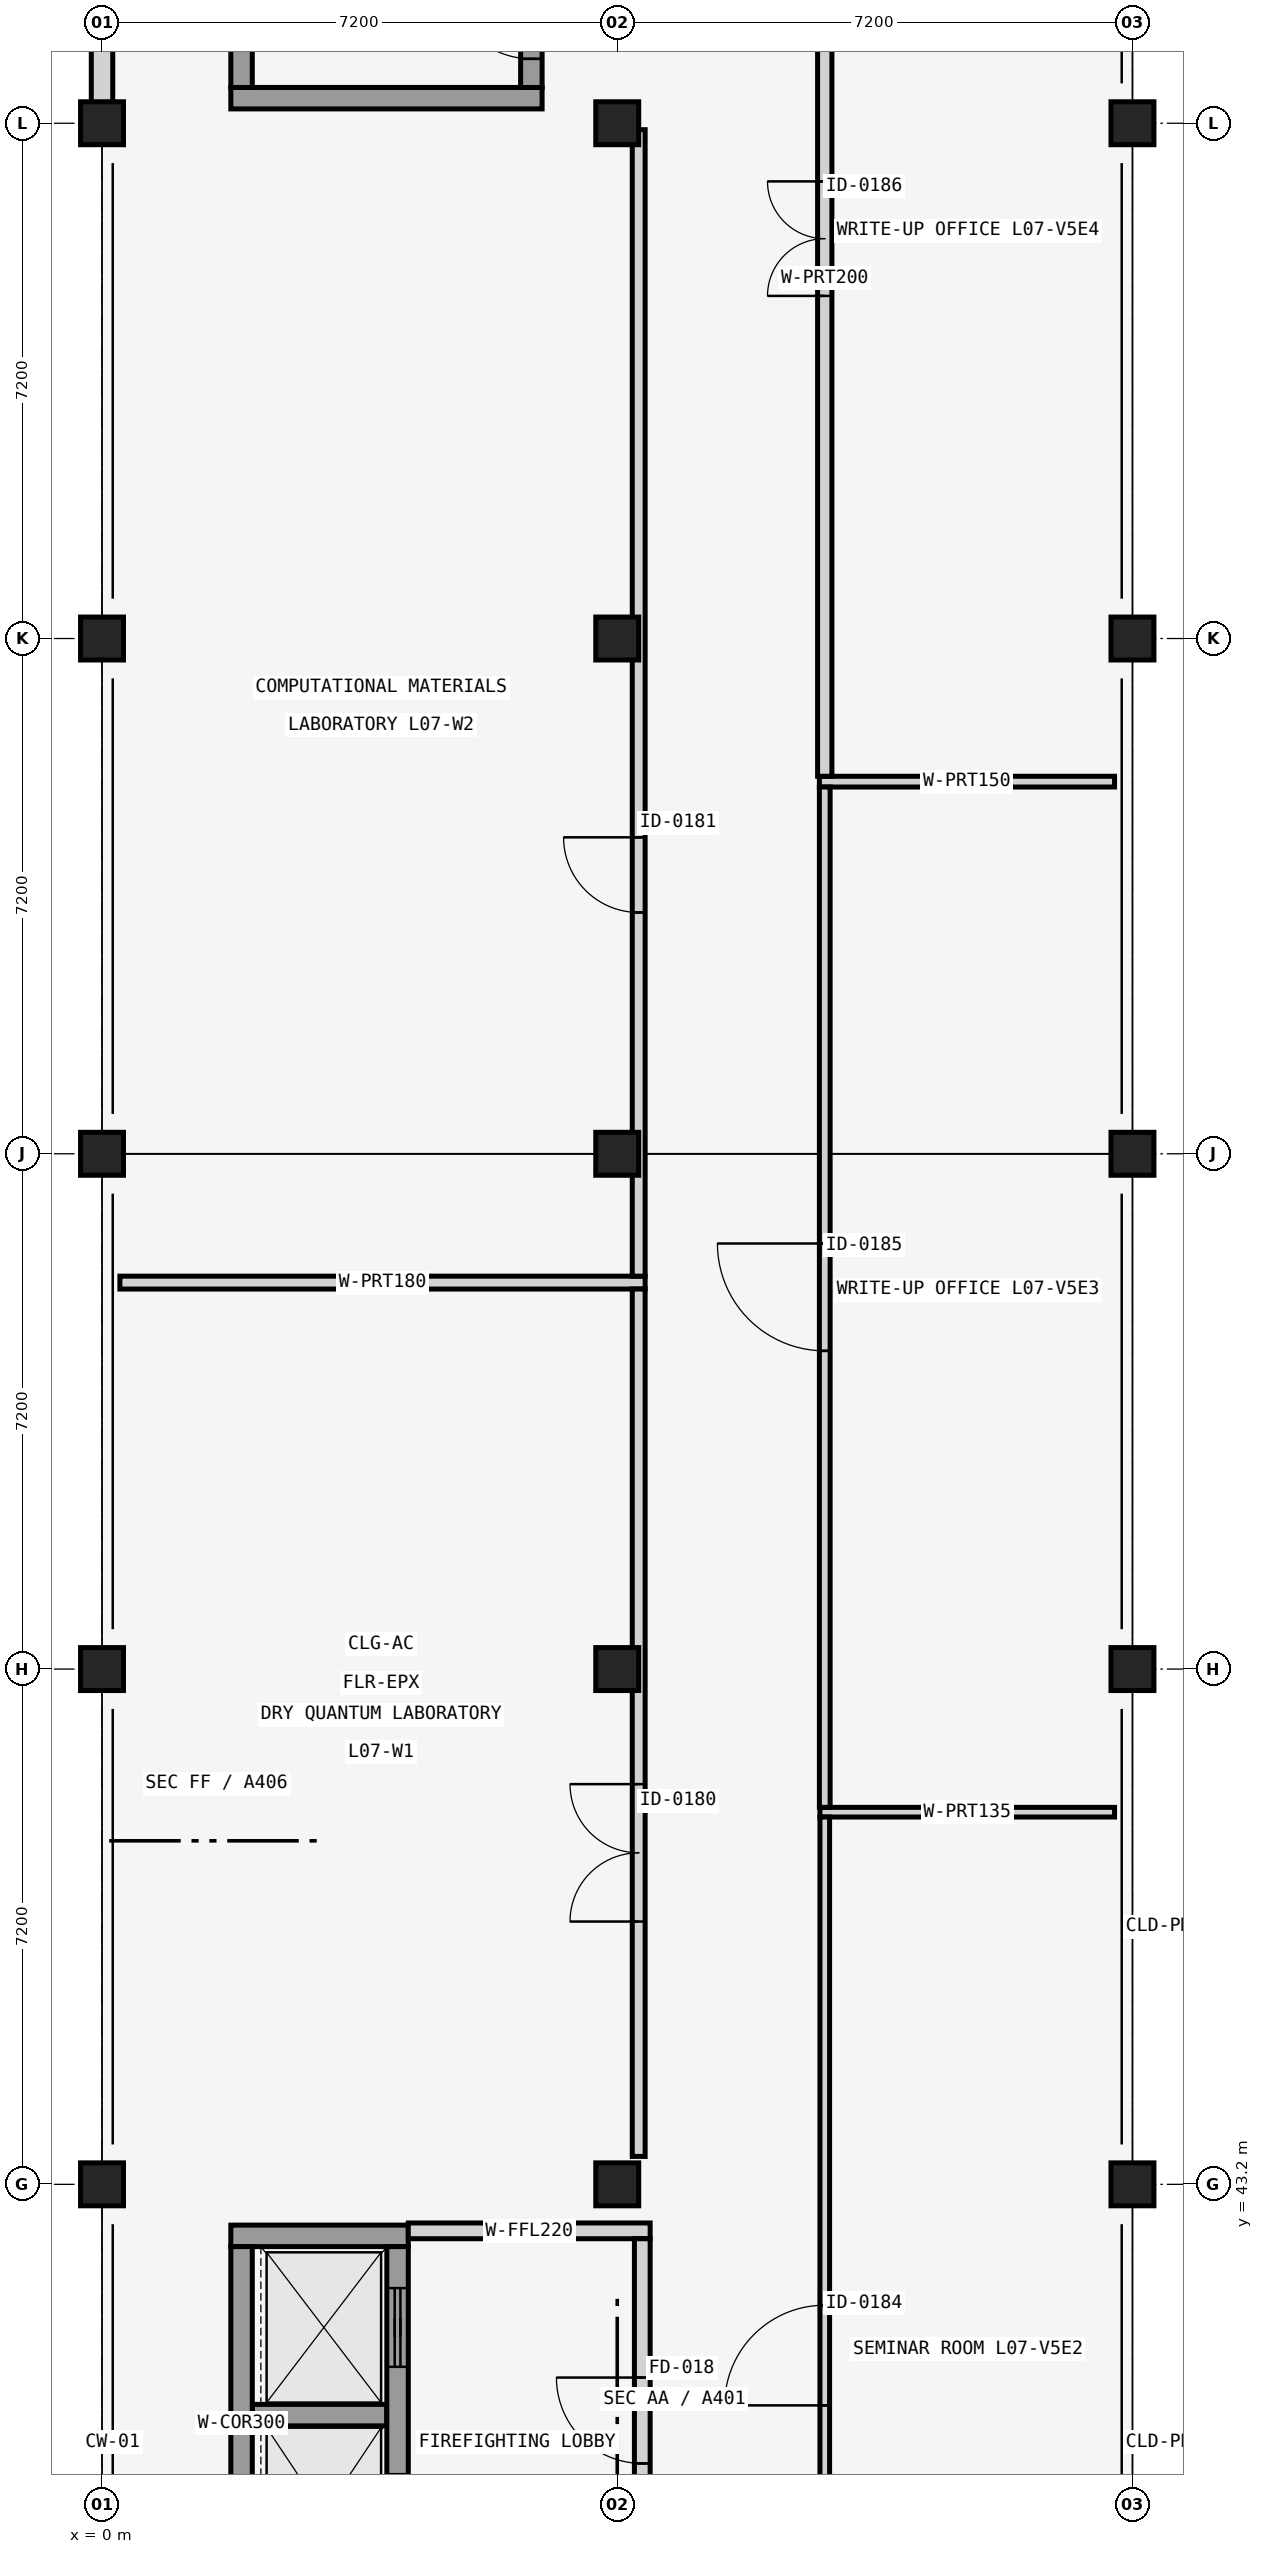
"""IFC4 building model, lengths in metres.
Left out: names, types, materials, properties, quantities, classifications, styles, units other than length and angle.
Written with IfcOpenShell. Run it as: python <this file> out.ifc"""

import sys

from ifc_helpers import new_model, si_unit, direction, frame, frame_2d, origin, origin_2d, place, context, subcontext, project, spatial, rectangle, extrude, element, fill, save


model = new_model("IFC4")
c1 = context("Model", 3, precision=1e-05, world=origin(), true_north=direction((0.0, 1.0)))
c2 = subcontext(c1, "Body", "Model", "MODEL_VIEW")
j1 = project(units=[si_unit("LENGTHUNIT", "METRE"), si_unit("PLANEANGLEUNIT", "RADIAN")], contexts=[c1])
p1 = place(None, origin())
s1 = spatial("IfcSite", under=j1, at=p1, CompositionType="ELEMENT")
p2 = place(p1, origin())
s2 = spatial("IfcBuilding", under=s1, at=p2, CompositionType="ELEMENT")
p3 = place(p2, frame((0.0, 0.0, 29.76)))
s3 = spatial("IfcBuildingStorey", under=s2, at=p3, CompositionType="ELEMENT", Elevation=29.76)
for number, where, z_axis, x_axis in (
    (1, (0.0, 43.2, 0.0), (0.0, 0.0, 1.0), (1.0, 0.0, 0.0)),
    (2, (0.0, 50.4, 0.0), (0.0, 0.0, 1.0), (1.0, 0.0, 0.0)),
    (3, (0.0, 57.6, 0.0), (0.0, 0.0, 1.0), (1.0, 0.0, 0.0)),
    (4, (0.0, 64.8, 0.0), (0.0, 0.0, 1.0), (1.0, 0.0, 0.0)),
    (5, (0.0, 72.0, 0.0), (0.0, 0.0, 1.0), (1.0, 0.0, 0.0)),
    (6, (7.2, 43.2, 0.0), (0.0, 0.0, 1.0), (1.0, 0.0, 0.0)),
    (7, (7.2, 50.4, 0.0), (0.0, 0.0, 1.0), (1.0, 0.0, 0.0)),
    (8, (7.2, 57.6, 0.0), (0.0, 0.0, 1.0), (1.0, 0.0, 0.0)),
    (9, (7.2, 64.8, 0.0), (0.0, 0.0, 1.0), (1.0, 0.0, 0.0)),
    (10, (7.2, 72.0, 0.0), (0.0, 0.0, 1.0), (1.0, 0.0, 0.0)),
    (11, (14.4, 43.2, 0.0), (0.0, 0.0, 1.0), (1.0, 0.0, 0.0)),
    (12, (14.4, 50.4, 0.0), (0.0, 0.0, 1.0), (1.0, 0.0, 0.0)),
    (13, (14.4, 57.6, 0.0), (0.0, 0.0, 1.0), (1.0, 0.0, 0.0)),
    (14, (14.4, 64.8, 0.0), (0.0, 0.0, 1.0), (1.0, 0.0, 0.0)),
    (15, (14.4, 72.0, 0.0), (0.0, 0.0, 1.0), (1.0, 0.0, 0.0)),
):
    element("IfcColumn", number, at=place(p3, frame(where, z_axis=z_axis, x_axis=x_axis)), inside=s3, PredefinedType="COLUMN", context=c2, shape_type="SweptSolid", body=[
        extrude(rectangle(XDim=0.6, YDim=0.6, at=origin_2d()), origin(), (0.0, 0.0, 1.0), 4.16),
    ])
p4 = place(p3, frame((0.0, 72.29, 0.0), z_axis=(0.0, 0.0, 1.0), x_axis=(0.0, 1.0, 0.0)))
e16 = element("IfcWall", 16, at=p4, inside=s3, PredefinedType="SOLIDWALL", context=c2, shape_type="SweptSolid", body=[
    extrude(rectangle(XDim=6.62, YDim=0.3, at=frame_2d((3.31, 0.0))), origin(), (0.0, 0.0, 1.0), 3.21),
])
p5 = place(p4, frame((3.085, 0.0, 0.65)))
e17 = element("IfcOpeningElement", 17, at=p5, cuts=e16, PredefinedType="OPENING", context=c2, shape_type="SweptSolid", body=[
    extrude(rectangle(XDim=0.45, YDim=2.4, at=frame_2d((0.225, 1.2))), frame((0.0, 0.16, 0.0), z_axis=(0.0, -1.0, 0.0), x_axis=(1.0, 0.0, 0.0)), (0.0, 0.0, 1.0), 0.32),
])
p6 = place(p3, frame((1.8, 42.48, 0.0), z_axis=(0.0, 0.0, 1.0), x_axis=(1.0, 0.0, 0.0)))
e18 = element("IfcWall", 18, at=p6, inside=s3, PredefinedType="SHEAR", context=c2, shape_type="SweptSolid", body=[
    extrude(rectangle(XDim=2.48, YDim=0.3, at=frame_2d((1.24, 0.0))), origin(), (0.0, 0.0, 1.0), 3.81),
])
p7 = place(p3, frame((2.1, 39.975, 0.0), z_axis=(0.0, 0.0, 1.0), x_axis=(1.0, 0.0, 0.0)))
e19 = element("IfcWall", 19, at=p7, inside=s3, PredefinedType="SHEAR", context=c2, shape_type="SweptSolid", body=[
    extrude(rectangle(XDim=1.88, YDim=0.3, at=frame_2d((0.94, 0.0))), origin(), (0.0, 0.0, 1.0), 3.81),
])
p8 = place(p3, frame((1.95, 37.4, 0.0), z_axis=(0.0, 0.0, 1.0), x_axis=(0.0, 1.0, 0.0)))
e20 = element("IfcWall", 20, at=p8, inside=s3, PredefinedType="SHEAR", context=c2, shape_type="SweptSolid", body=[
    extrude(rectangle(XDim=4.93, YDim=0.3, at=frame_2d((2.465, 0.0))), origin(), (0.0, 0.0, 1.0), 3.81),
])
p9 = place(p3, frame((4.13, 37.4, 0.0), z_axis=(0.0, 0.0, 1.0), x_axis=(0.0, 1.0, 0.0)))
e21 = element("IfcWall", 21, at=p9, inside=s3, PredefinedType="SHEAR", context=c2, shape_type="SweptSolid", body=[
    extrude(rectangle(XDim=4.93, YDim=0.3, at=frame_2d((2.465, 0.0))), origin(), (0.0, 0.0, 1.0), 3.81),
])
p10 = place(p9, frame((0.65, 0.0, 0.0)))
e22 = element("IfcOpeningElement", 22, at=p10, cuts=e21, PredefinedType="OPENING", context=c2, shape_type="SweptSolid", body=[
    extrude(rectangle(XDim=1.1, YDim=2.2, at=frame_2d((0.55, 1.1))), frame((0.0, 0.16, 0.0), z_axis=(0.0, -1.0, 0.0), x_axis=(1.0, 0.0, 0.0)), (0.0, 0.0, 1.0), 0.32),
])
p11 = place(p9, frame((3.25, 0.0, 0.0)))
e23 = element("IfcOpeningElement", 23, at=p11, cuts=e21, PredefinedType="OPENING", context=c2, shape_type="SweptSolid", body=[
    extrude(rectangle(XDim=1.1, YDim=2.2, at=frame_2d((0.55, 1.1))), frame((0.0, 0.16, 0.0), z_axis=(0.0, -1.0, 0.0), x_axis=(1.0, 0.0, 0.0)), (0.0, 0.0, 1.0), 0.32),
])
p12 = place(p3, frame((4.28, 42.55, 0.0), z_axis=(0.0, 0.0, 1.0), x_axis=(1.0, 0.0, 0.0)))
e24 = element("IfcWall", 24, at=p12, inside=s3, PredefinedType="SOLIDWALL", context=c2, shape_type="SweptSolid", body=[
    extrude(rectangle(XDim=3.38, YDim=0.22, at=frame_2d((1.69, 0.0))), origin(), (0.0, 0.0, 1.0), 3.01),
])
p13 = place(p3, frame((7.55, 37.36, 0.0), z_axis=(0.0, 0.0, 1.0), x_axis=(0.0, 1.0, 0.0)))
e25 = element("IfcWall", 25, at=p13, inside=s3, PredefinedType="SOLIDWALL", context=c2, shape_type="SweptSolid", body=[
    extrude(rectangle(XDim=5.08, YDim=0.22, at=frame_2d((2.54, 0.0))), origin(), (0.0, 0.0, 1.0), 3.51),
])
p14 = place(p13, frame((1.94, 0.0, 0.0)))
e26 = element("IfcOpeningElement", 26, at=p14, cuts=e25, PredefinedType="OPENING", context=c2, shape_type="SweptSolid", body=[
    extrude(rectangle(XDim=1.2, YDim=2.2, at=frame_2d((0.6, 1.1))), frame((0.0, 0.12, 0.0), z_axis=(0.0, -1.0, 0.0), x_axis=(1.0, 0.0, 0.0)), (0.0, 0.0, 1.0), 0.24),
])
p15 = place(p3, frame((1.8, 72.35, 0.0), z_axis=(0.0, 0.0, 1.0), x_axis=(1.0, 0.0, 0.0)))
e27 = element("IfcWall", 27, at=p15, inside=s3, PredefinedType="SHEAR", context=c2, shape_type="SweptSolid", body=[
    extrude(rectangle(XDim=4.35, YDim=0.3, at=frame_2d((2.175, 0.0))), origin(), (0.0, 0.0, 1.0), 3.81),
])
p16 = place(p3, frame((1.95, 72.5, 0.0), z_axis=(0.0, 0.0, 1.0), x_axis=(0.0, 1.0, 0.0)))
e28 = element("IfcWall", 28, at=p16, inside=s3, PredefinedType="SHEAR", context=c2, shape_type="SweptSolid", body=[
    extrude(rectangle(XDim=7.8, YDim=0.3, at=frame_2d((3.9, 0.0))), origin(), (0.0, 0.0, 1.0), 3.81),
])
p17 = place(p3, frame((6.0, 72.5, 0.0), z_axis=(0.0, 0.0, 1.0), x_axis=(0.0, 1.0, 0.0)))
e29 = element("IfcWall", 29, at=p17, inside=s3, PredefinedType="SHEAR", context=c2, shape_type="SweptSolid", body=[
    extrude(rectangle(XDim=7.8, YDim=0.3, at=frame_2d((3.9, 0.0))), origin(), (0.0, 0.0, 1.0), 3.81),
])
p18 = place(p17, frame((0.4, 0.0, 0.0)))
e30 = element("IfcOpeningElement", 30, at=p18, cuts=e29, PredefinedType="OPENING", context=c2, shape_type="SweptSolid", body=[
    extrude(rectangle(XDim=1.15, YDim=2.2, at=frame_2d((0.575, 1.1))), frame((0.0, 0.16, 0.0), z_axis=(0.0, -1.0, 0.0), x_axis=(1.0, 0.0, 0.0)), (0.0, 0.0, 1.0), 0.32),
])
p19 = place(p3, frame((0.25, 55.8, 0.0), z_axis=(0.0, 0.0, 1.0), x_axis=(1.0, 0.0, 0.0)))
e31 = element("IfcWall", 31, at=p19, inside=s3, PredefinedType="PARTITIONING", context=c2, shape_type="SweptSolid", body=[
    extrude(rectangle(XDim=7.34, YDim=0.18, at=frame_2d((3.67, 0.0))), origin(), (0.0, 0.0, 1.0), 3.01),
])
p20 = place(p3, frame((7.5, 43.59, 0.0), z_axis=(0.0, 0.0, 1.0), x_axis=(0.0, 1.0, 0.0)))
e32 = element("IfcWall", 32, at=p20, inside=s3, PredefinedType="PARTITIONING", context=c2, shape_type="SweptSolid", body=[
    extrude(rectangle(XDim=12.12, YDim=0.18, at=frame_2d((6.06, 0.0))), origin(), (0.0, 0.0, 1.0), 3.21),
])
p21 = place(p20, frame((3.282, 0.0, 0.0)))
e33 = element("IfcOpeningElement", 33, at=p21, cuts=e32, PredefinedType="OPENING", context=c2, shape_type="SweptSolid", body=[
    extrude(rectangle(XDim=1.92, YDim=2.28, at=frame_2d((0.96, 1.14))), frame((0.0, 0.1, 0.0), z_axis=(0.0, -1.0, 0.0), x_axis=(1.0, 0.0, 0.0)), (0.0, 0.0, 1.0), 0.2),
])
p22 = place(p3, frame((7.5, 55.89, 0.0), z_axis=(0.0, 0.0, 1.0), x_axis=(0.0, 1.0, 0.0)))
e34 = element("IfcWall", 34, at=p22, inside=s3, PredefinedType="PARTITIONING", context=c2, shape_type="SweptSolid", body=[
    extrude(rectangle(XDim=16.02, YDim=0.18, at=frame_2d((8.01, 0.0))), origin(), (0.0, 0.0, 1.0), 3.21),
])
p23 = place(p22, frame((5.082, 0.0, 0.0)))
e35 = element("IfcOpeningElement", 35, at=p23, cuts=e34, PredefinedType="OPENING", context=c2, shape_type="SweptSolid", body=[
    extrude(rectangle(XDim=1.05, YDim=2.15, at=frame_2d((0.525, 1.075))), frame((0.0, 0.1, 0.0), z_axis=(0.0, -1.0, 0.0), x_axis=(1.0, 0.0, 0.0)), (0.0, 0.0, 1.0), 0.2),
])
p24 = place(p3, frame((10.032, 48.4, 0.0), z_axis=(0.0, 0.0, 1.0), x_axis=(1.0, 0.0, 0.0)))
e36 = element("IfcWall", 36, at=p24, inside=s3, PredefinedType="PARTITIONING", context=c2, shape_type="SweptSolid", body=[
    extrude(rectangle(XDim=4.117, YDim=0.135, at=frame_2d((2.059, 0.0))), origin(), (0.0, 0.0, 1.0), 3.81),
])
p25 = place(p3, frame((10.1, 33.29, 0.0), z_axis=(0.0, 0.0, 1.0), x_axis=(0.0, 1.0, 0.0)))
e37 = element("IfcWall", 37, at=p25, inside=s3, PredefinedType="PARTITIONING", context=c2, shape_type="SweptSolid", body=[
    extrude(rectangle(XDim=15.042, YDim=0.135, at=frame_2d((7.521, 0.0))), origin(), (0.0, 0.0, 1.0), 3.21),
])
p26 = place(p25, frame((6.821, 0.0, 0.0)))
e38 = element("IfcOpeningElement", 38, at=p26, cuts=e37, PredefinedType="OPENING", context=c2, shape_type="SweptSolid", body=[
    extrude(rectangle(XDim=1.4, YDim=2.2, at=frame_2d((0.7, 1.1))), frame((0.0, 0.078, 0.0), z_axis=(0.0, -1.0, 0.0), x_axis=(1.0, 0.0, 0.0)), (0.0, 0.0, 1.0), 0.155),
])
p27 = place(p3, frame((10.025, 62.8, 0.0), z_axis=(0.0, 0.0, 1.0), x_axis=(1.0, 0.0, 0.0)))
e39 = element("IfcWall", 39, at=p27, inside=s3, PredefinedType="PARTITIONING", context=c2, shape_type="SweptSolid", body=[
    extrude(rectangle(XDim=4.125, YDim=0.15, at=frame_2d((2.062, 0.0))), origin(), (0.0, 0.0, 1.0), 3.21),
])
p28 = place(p3, frame((10.1, 48.468, 0.0), z_axis=(0.0, 0.0, 1.0), x_axis=(0.0, 1.0, 0.0)))
e40 = element("IfcWall", 40, at=p28, inside=s3, PredefinedType="PARTITIONING", context=c2, shape_type="SweptSolid", body=[
    extrude(rectangle(XDim=14.258, YDim=0.15, at=frame_2d((7.129, 0.0))), origin(), (0.0, 0.0, 1.0), 3.21),
])
p29 = place(p28, frame((6.379, 0.0, 0.0)))
e41 = element("IfcOpeningElement", 41, at=p29, cuts=e40, PredefinedType="OPENING", context=c2, shape_type="SweptSolid", body=[
    extrude(rectangle(XDim=1.5, YDim=2.2, at=frame_2d((0.75, 1.1))), frame((0.0, 0.085, 0.0), z_axis=(0.0, -1.0, 0.0), x_axis=(1.0, 0.0, 0.0)), (0.0, 0.0, 1.0), 0.17),
])
p30 = place(p3, frame((10.1, 62.875, 0.0), z_axis=(0.0, 0.0, 1.0), x_axis=(0.0, 1.0, 0.0)))
e42 = element("IfcWall", 42, at=p30, inside=s3, PredefinedType="PARTITIONING", context=c2, shape_type="SweptSolid", body=[
    extrude(rectangle(XDim=15.025, YDim=0.2, at=frame_2d((7.512, 0.0))), origin(), (0.0, 0.0, 1.0), 3.21),
])
p31 = place(p30, frame((6.712, 0.0, 0.0)))
e43 = element("IfcOpeningElement", 43, at=p31, cuts=e42, PredefinedType="OPENING", context=c2, shape_type="SweptSolid", body=[
    extrude(rectangle(XDim=1.6, YDim=2.25, at=frame_2d((0.8, 1.125))), frame((0.0, 0.11, 0.0), z_axis=(0.0, -1.0, 0.0), x_axis=(1.0, 0.0, 0.0)), (0.0, 0.0, 1.0), 0.22),
])
p32 = place(p11, origin())
e44 = element("IfcDoor", 44, at=p32, inside=s3, OperationType="SLIDING_TO_LEFT", PredefinedType="DOOR", context=c2, shape_type="SweptSolid", body=[
    extrude(rectangle(XDim=1.1, YDim=2.2, at=frame_2d((0.55, 1.1))), frame((0.0, 0.025, 0.0), z_axis=(0.0, -1.0, 0.0), x_axis=(1.0, 0.0, 0.0)), (0.0, 0.0, 1.0), 0.05),
])
fill(e23, e44)
p33 = place(p14, origin())
e45 = element("IfcDoor", 45, at=p33, inside=s3, OperationType="SINGLE_SWING_RIGHT", PredefinedType="DOOR", context=c2, shape_type="SweptSolid", body=[
    extrude(rectangle(XDim=1.2, YDim=2.2, at=frame_2d((0.6, 1.1))), frame((0.0, 0.025, 0.0), z_axis=(0.0, -1.0, 0.0), x_axis=(1.0, 0.0, 0.0)), (0.0, 0.0, 1.0), 0.05),
])
fill(e26, e45)
p34 = place(p18, origin())
e46 = element("IfcDoor", 46, at=p34, inside=s3, OperationType="SINGLE_SWING_RIGHT", PredefinedType="DOOR", context=c2, shape_type="SweptSolid", body=[
    extrude(rectangle(XDim=1.15, YDim=2.2, at=frame_2d((0.575, 1.1))), frame((0.0, 0.025, 0.0), z_axis=(0.0, -1.0, 0.0), x_axis=(1.0, 0.0, 0.0)), (0.0, 0.0, 1.0), 0.05),
])
fill(e30, e46)
p35 = place(p21, origin())
e47 = element("IfcDoor", 47, at=p35, inside=s3, OperationType="DOUBLE_DOOR_SINGLE_SWING", PredefinedType="DOOR", context=c2, shape_type="SweptSolid", body=[
    extrude(rectangle(XDim=1.92, YDim=2.28, at=frame_2d((0.96, 1.14))), frame((0.0, 0.025, 0.0), z_axis=(0.0, -1.0, 0.0), x_axis=(1.0, 0.0, 0.0)), (0.0, 0.0, 1.0), 0.05),
])
fill(e33, e47)
p36 = place(p23, origin())
e48 = element("IfcDoor", 48, at=p36, inside=s3, OperationType="SINGLE_SWING_RIGHT", PredefinedType="DOOR", context=c2, shape_type="SweptSolid", body=[
    extrude(rectangle(XDim=1.05, YDim=2.15, at=frame_2d((0.525, 1.075))), frame((0.0, 0.025, 0.0), z_axis=(0.0, -1.0, 0.0), x_axis=(1.0, 0.0, 0.0)), (0.0, 0.0, 1.0), 0.05),
])
fill(e35, e48)
p37 = place(p26, origin())
e49 = element("IfcDoor", 49, at=p37, inside=s3, OperationType="SINGLE_SWING_LEFT", PredefinedType="DOOR", context=c2, shape_type="SweptSolid", body=[
    extrude(rectangle(XDim=1.4, YDim=2.2, at=frame_2d((0.7, 1.1))), frame((0.0, 0.025, 0.0), z_axis=(0.0, -1.0, 0.0), x_axis=(1.0, 0.0, 0.0)), (0.0, 0.0, 1.0), 0.05),
])
fill(e38, e49)
p38 = place(p29, origin())
e50 = element("IfcDoor", 50, at=p38, inside=s3, OperationType="SINGLE_SWING_RIGHT", PredefinedType="DOOR", context=c2, shape_type="SweptSolid", body=[
    extrude(rectangle(XDim=1.5, YDim=2.2, at=frame_2d((0.75, 1.1))), frame((0.0, 0.025, 0.0), z_axis=(0.0, -1.0, 0.0), x_axis=(1.0, 0.0, 0.0)), (0.0, 0.0, 1.0), 0.05),
])
fill(e41, e50)
p39 = place(p31, origin())
e51 = element("IfcDoor", 51, at=p39, inside=s3, OperationType="DOUBLE_DOOR_SINGLE_SWING", PredefinedType="DOOR", context=c2, shape_type="SweptSolid", body=[
    extrude(rectangle(XDim=1.6, YDim=2.25, at=frame_2d((0.8, 1.125))), frame((0.0, 0.025, 0.0), z_axis=(0.0, -1.0, 0.0), x_axis=(1.0, 0.0, 0.0)), (0.0, 0.0, 1.0), 0.05),
])
fill(e43, e51)
save(model, sys.argv[1])
